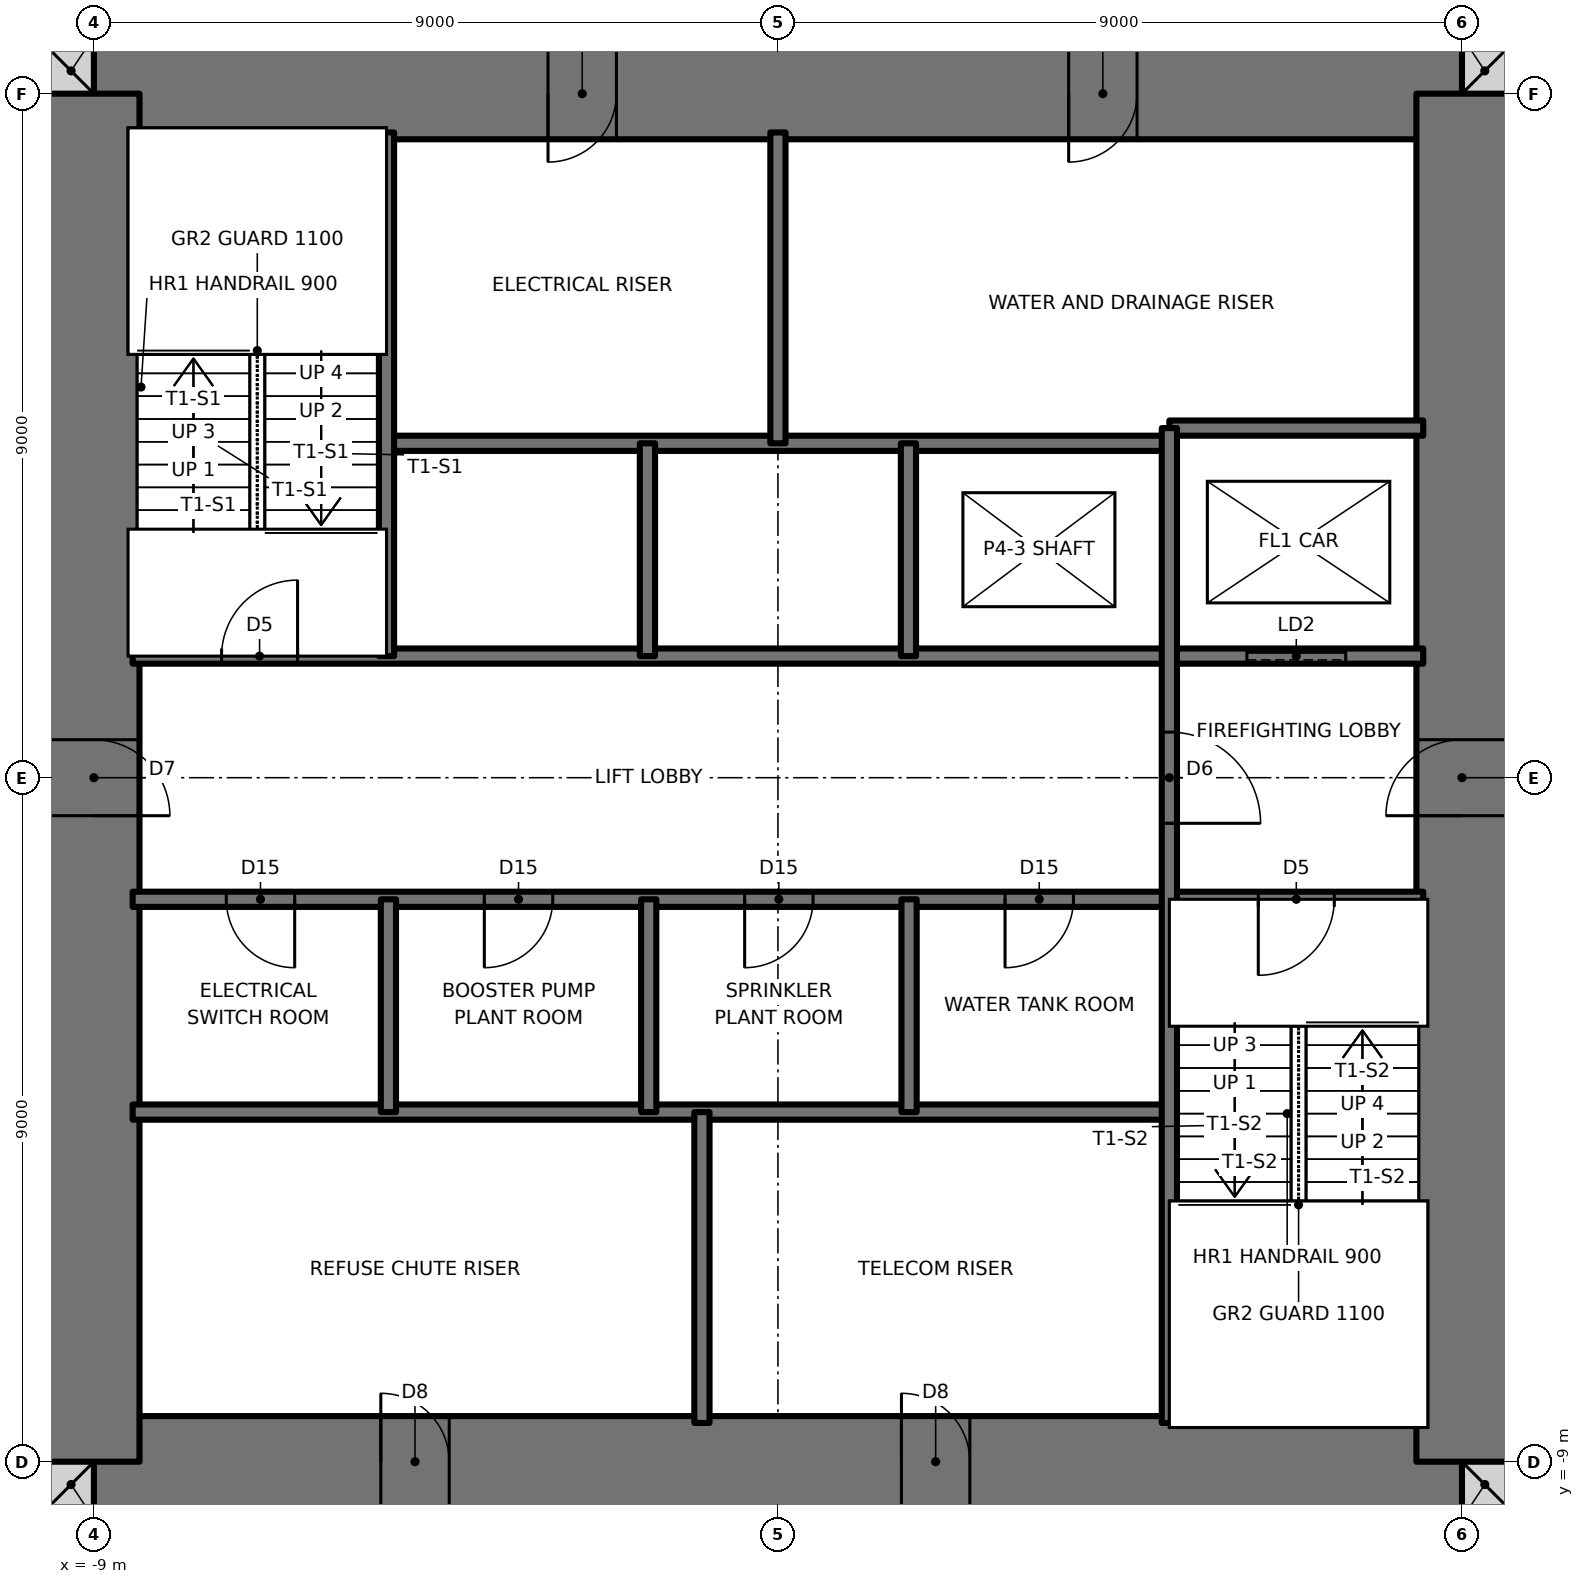
"""IFC4 building model, lengths in metres.
Left out: names, types, materials, properties, quantities, classifications, styles, units other than length and angle.
Written with IfcOpenShell. Run it as: python <this file> out.ifc"""

import sys

from ifc_helpers import new_model, si_unit, direction, frame, frame_2d, origin, place, context, subcontext, project, spatial, rectangle, extrude, element, fill, save


model = new_model("IFC4")
c1 = context("Model", 3, precision=1e-05, world=origin(), true_north=direction((0.0, 1.0)))
c2 = subcontext(c1, "Body", "Model", "MODEL_VIEW")
j1 = project(units=[si_unit("LENGTHUNIT", "METRE"), si_unit("PLANEANGLEUNIT", "RADIAN")], contexts=[c1])
p1 = place(None, origin())
s1 = spatial("IfcSite", under=j1, at=p1, CompositionType="ELEMENT")
p2 = place(p1, origin())
s2 = spatial("IfcBuilding", under=s1, at=p2, CompositionType="ELEMENT")
p3 = place(p2, frame((0.0, 0.0, 209.0)))
s3 = spatial("IfcBuildingStorey", under=s2, at=p3, CompositionType="ELEMENT", Elevation=209.0)
for number, where, z_axis, x_axis in (
    (1, (-9.6, -9.3, 0.0), (0.0, 0.0, 1.0), (1.0, 0.0, 0.0)),
    (2, (9.0, -9.3, 0.0), (0.0, 0.0, 1.0), (1.0, 0.0, 0.0)),
    (3, (9.0, 9.3, 0.0), (0.0, 0.0, 1.0), (1.0, 0.0, 0.0)),
    (4, (-9.6, 9.3, 0.0), (0.0, 0.0, 1.0), (1.0, 0.0, 0.0)),
):
    element("IfcWall", number, at=place(p3, frame(where, z_axis=z_axis, x_axis=x_axis)), inside=s3, PredefinedType="SOLIDWALL", context=c2, shape_type="SweptSolid", body=[
        extrude(rectangle(XDim=0.6, YDim=0.6, at=frame_2d((0.3, 0.0))), origin(), (0.0, 0.0, 1.0), 6.0),
    ])
p4 = place(p3, frame((-9.0, -9.0, 0.0), z_axis=(0.0, 0.0, 1.0), x_axis=(1.0, 0.0, 0.0)))
e5 = element("IfcWall", 5, at=p4, inside=s3, PredefinedType="SHEAR", context=c2, shape_type="SweptSolid", body=[
    extrude(rectangle(XDim=18.0, YDim=1.2, at=frame_2d((9.0, 0.0))), origin(), (0.0, 0.0, 1.0), 6.0),
])
p5 = place(p4, frame((3.775, 0.0, 0.0)))
e6 = element("IfcOpeningElement", 6, at=p5, cuts=e5, PredefinedType="OPENING", context=c2, shape_type="SweptSolid", body=[
    extrude(rectangle(XDim=0.9, YDim=2.1, at=frame_2d((0.45, 1.05))), frame((0.0, 0.61, 0.0), z_axis=(0.0, -1.0, 0.0), x_axis=(1.0, 0.0, 0.0)), (0.0, 0.0, 1.0), 1.22),
])
p6 = place(p4, frame((10.625, 0.0, 0.0)))
e7 = element("IfcOpeningElement", 7, at=p6, cuts=e5, PredefinedType="OPENING", context=c2, shape_type="SweptSolid", body=[
    extrude(rectangle(XDim=0.9, YDim=2.1, at=frame_2d((0.45, 1.05))), frame((0.0, 0.61, 0.0), z_axis=(0.0, -1.0, 0.0), x_axis=(1.0, 0.0, 0.0)), (0.0, 0.0, 1.0), 1.22),
])
p7 = place(p3, frame((9.0, 9.0, 0.0), z_axis=(0.0, 0.0, 1.0), x_axis=(-1.0, 0.0, 0.0)))
e8 = element("IfcWall", 8, at=p7, inside=s3, PredefinedType="SHEAR", context=c2, shape_type="SweptSolid", body=[
    extrude(rectangle(XDim=18.0, YDim=1.2, at=frame_2d((9.0, 0.0))), origin(), (0.0, 0.0, 1.0), 6.0),
])
p8 = place(p7, frame((11.125, 0.0, 0.0)))
e9 = element("IfcOpeningElement", 9, at=p8, cuts=e8, PredefinedType="OPENING", context=c2, shape_type="SweptSolid", body=[
    extrude(rectangle(XDim=0.9, YDim=2.1, at=frame_2d((0.45, 1.05))), frame((0.0, 0.61, 0.0), z_axis=(0.0, -1.0, 0.0), x_axis=(1.0, 0.0, 0.0)), (0.0, 0.0, 1.0), 1.22),
])
p9 = place(p7, frame((4.275, 0.0, 0.0)))
e10 = element("IfcOpeningElement", 10, at=p9, cuts=e8, PredefinedType="OPENING", context=c2, shape_type="SweptSolid", body=[
    extrude(rectangle(XDim=0.9, YDim=2.1, at=frame_2d((0.45, 1.05))), frame((0.0, 0.61, 0.0), z_axis=(0.0, -1.0, 0.0), x_axis=(1.0, 0.0, 0.0)), (0.0, 0.0, 1.0), 1.22),
])
p10 = place(p3, frame((9.0, -9.0, 0.0), z_axis=(0.0, 0.0, 1.0), x_axis=(0.0, 1.0, 0.0)))
e11 = element("IfcWall", 11, at=p10, inside=s3, PredefinedType="SHEAR", context=c2, shape_type="SweptSolid", body=[
    extrude(rectangle(XDim=18.0, YDim=1.2, at=frame_2d((9.0, 0.0))), origin(), (0.0, 0.0, 1.0), 6.0),
])
p11 = place(p10, frame((8.5, 0.0, 0.0)))
e12 = element("IfcOpeningElement", 12, at=p11, cuts=e11, PredefinedType="OPENING", context=c2, shape_type="SweptSolid", body=[
    extrude(rectangle(XDim=1.0, YDim=2.1, at=frame_2d((0.5, 1.05))), frame((0.0, 0.61, 0.0), z_axis=(0.0, -1.0, 0.0), x_axis=(1.0, 0.0, 0.0)), (0.0, 0.0, 1.0), 1.22),
])
p12 = place(p3, frame((-9.0, 9.0, 0.0), z_axis=(0.0, 0.0, 1.0), x_axis=(0.0, -1.0, 0.0)))
e13 = element("IfcWall", 13, at=p12, inside=s3, PredefinedType="SHEAR", context=c2, shape_type="SweptSolid", body=[
    extrude(rectangle(XDim=18.0, YDim=1.2, at=frame_2d((9.0, 0.0))), origin(), (0.0, 0.0, 1.0), 6.0),
])
p13 = place(p12, frame((8.5, 0.0, 0.0)))
e14 = element("IfcOpeningElement", 14, at=p13, cuts=e13, PredefinedType="OPENING", context=c2, shape_type="SweptSolid", body=[
    extrude(rectangle(XDim=1.0, YDim=2.1, at=frame_2d((0.5, 1.05))), frame((0.0, 0.61, 0.0), z_axis=(0.0, -1.0, 0.0), x_axis=(1.0, 0.0, 0.0)), (0.0, 0.0, 1.0), 1.22),
])
p14 = place(p3, frame((-8.49, -4.4, 0.0), z_axis=(0.0, 0.0, 1.0), x_axis=(1.0, 0.0, 0.0)))
e15 = element("IfcWall", 15, at=p14, inside=s3, PredefinedType="SOLIDWALL", context=c2, shape_type="SweptSolid", body=[
    extrude(rectangle(XDim=13.64, YDim=0.2, at=frame_2d((6.82, 0.0))), origin(), (0.0, 0.0, 1.0), 6.0),
])
p15 = place(p3, frame((-8.49, -1.6, 0.0), z_axis=(0.0, 0.0, 1.0), x_axis=(1.0, 0.0, 0.0)))
e16 = element("IfcWall", 16, at=p15, inside=s3, PredefinedType="SOLIDWALL", context=c2, shape_type="SweptSolid", body=[
    extrude(rectangle(XDim=16.98, YDim=0.2, at=frame_2d((8.49, 0.0))), origin(), (0.0, 0.0, 1.0), 6.0),
])
p16 = place(p15, frame((14.81, 0.0, 0.0)))
e17 = element("IfcOpeningElement", 17, at=p16, cuts=e16, PredefinedType="OPENING", context=c2, shape_type="SweptSolid", body=[
    extrude(rectangle(XDim=1.0, YDim=2.1, at=frame_2d((0.5, 1.05))), frame((0.0, 0.11, 0.0), z_axis=(0.0, -1.0, 0.0), x_axis=(1.0, 0.0, 0.0)), (0.0, 0.0, 1.0), 0.22),
])
p17 = place(p15, frame((1.232, 0.0, 0.0)))
e18 = element("IfcOpeningElement", 18, at=p17, cuts=e16, PredefinedType="OPENING", context=c2, shape_type="SweptSolid", body=[
    extrude(rectangle(XDim=0.9, YDim=2.1, at=frame_2d((0.45, 1.05))), frame((0.0, 0.11, 0.0), z_axis=(0.0, -1.0, 0.0), x_axis=(1.0, 0.0, 0.0)), (0.0, 0.0, 1.0), 0.22),
])
p18 = place(p15, frame((4.627, 0.0, 0.0)))
e19 = element("IfcOpeningElement", 19, at=p18, cuts=e16, PredefinedType="OPENING", context=c2, shape_type="SweptSolid", body=[
    extrude(rectangle(XDim=0.9, YDim=2.1, at=frame_2d((0.45, 1.05))), frame((0.0, 0.11, 0.0), z_axis=(0.0, -1.0, 0.0), x_axis=(1.0, 0.0, 0.0)), (0.0, 0.0, 1.0), 0.22),
])
p19 = place(p15, frame((8.052, 0.0, 0.0)))
e20 = element("IfcOpeningElement", 20, at=p19, cuts=e16, PredefinedType="OPENING", context=c2, shape_type="SweptSolid", body=[
    extrude(rectangle(XDim=0.9, YDim=2.1, at=frame_2d((0.45, 1.05))), frame((0.0, 0.11, 0.0), z_axis=(0.0, -1.0, 0.0), x_axis=(1.0, 0.0, 0.0)), (0.0, 0.0, 1.0), 0.22),
])
p20 = place(p15, frame((11.478, 0.0, 0.0)))
e21 = element("IfcOpeningElement", 21, at=p20, cuts=e16, PredefinedType="OPENING", context=c2, shape_type="SweptSolid", body=[
    extrude(rectangle(XDim=0.9, YDim=2.1, at=frame_2d((0.45, 1.05))), frame((0.0, 0.11, 0.0), z_axis=(0.0, -1.0, 0.0), x_axis=(1.0, 0.0, 0.0)), (0.0, 0.0, 1.0), 0.22),
])
p21 = place(p3, frame((-8.49, 1.6, 0.0), z_axis=(0.0, 0.0, 1.0), x_axis=(1.0, 0.0, 0.0)))
e22 = element("IfcWall", 22, at=p21, inside=s3, PredefinedType="SOLIDWALL", context=c2, shape_type="SweptSolid", body=[
    extrude(rectangle(XDim=16.98, YDim=0.2, at=frame_2d((8.49, 0.0))), origin(), (0.0, 0.0, 1.0), 6.0),
])
p22 = place(p21, frame((1.17, 0.0, 0.0)))
e23 = element("IfcOpeningElement", 23, at=p22, cuts=e22, PredefinedType="OPENING", context=c2, shape_type="SweptSolid", body=[
    extrude(rectangle(XDim=1.0, YDim=2.1, at=frame_2d((0.5, 1.05))), frame((0.0, 0.11, 0.0), z_axis=(0.0, -1.0, 0.0), x_axis=(1.0, 0.0, 0.0)), (0.0, 0.0, 1.0), 0.22),
])
p23 = place(p21, frame((14.66, 0.0, 0.0)))
e24 = element("IfcOpeningElement", 24, at=p23, cuts=e22, PredefinedType="OPENING", context=c2, shape_type="SweptSolid", body=[
    extrude(rectangle(XDim=1.3, YDim=2.1, at=frame_2d((0.65, 1.05))), frame((0.0, 0.11, 0.0), z_axis=(0.0, -1.0, 0.0), x_axis=(1.0, 0.0, 0.0)), (0.0, 0.0, 1.0), 0.22),
])
p24 = place(p3, frame((-5.15, 4.4, 0.0), z_axis=(0.0, 0.0, 1.0), x_axis=(1.0, 0.0, 0.0)))
e25 = element("IfcWall", 25, at=p24, inside=s3, PredefinedType="SOLIDWALL", context=c2, shape_type="SweptSolid", body=[
    extrude(rectangle(XDim=10.3, YDim=0.2, at=frame_2d((5.15, 0.0))), origin(), (0.0, 0.0, 1.0), 6.0),
])
p25 = place(p3, frame((5.15, 4.6, 0.0), z_axis=(0.0, 0.0, 1.0), x_axis=(1.0, 0.0, 0.0)))
e26 = element("IfcWall", 26, at=p25, inside=s3, PredefinedType="SOLIDWALL", context=c2, shape_type="SweptSolid", body=[
    extrude(rectangle(XDim=3.34, YDim=0.2, at=frame_2d((1.67, 0.0))), origin(), (0.0, 0.0, 1.0), 6.0),
])
p26 = place(p3, frame((5.15, -8.49, 0.0), z_axis=(0.0, 0.0, 1.0), x_axis=(0.0, 1.0, 0.0)))
e27 = element("IfcWall", 27, at=p26, inside=s3, PredefinedType="SOLIDWALL", context=c2, shape_type="SweptSolid", body=[
    extrude(rectangle(XDim=13.09, YDim=0.2, at=frame_2d((6.545, 0.0))), origin(), (0.0, 0.0, 1.0), 6.0),
])
p27 = place(p26, frame((7.89, 0.0, 0.0)))
e28 = element("IfcOpeningElement", 28, at=p27, cuts=e27, PredefinedType="OPENING", context=c2, shape_type="SweptSolid", body=[
    extrude(rectangle(XDim=1.2, YDim=2.1, at=frame_2d((0.6, 1.05))), frame((0.0, 0.11, 0.0), z_axis=(0.0, -1.0, 0.0), x_axis=(1.0, 0.0, 0.0)), (0.0, 0.0, 1.0), 0.22),
])
for number, where, z_axis, x_axis in (
    (29, (1.725, -4.4, 0.0), (0.0, 0.0, 1.0), (0.0, 1.0, 0.0)),
    (30, (1.717, 1.6, 0.0), (0.0, 0.0, 1.0), (0.0, 1.0, 0.0)),
):
    element("IfcWall", number, at=place(p3, frame(where, z_axis=z_axis, x_axis=x_axis)), inside=s3, PredefinedType="SOLIDWALL", context=c2, shape_type="SweptSolid", body=[
        extrude(rectangle(XDim=2.8, YDim=0.2, at=frame_2d((1.4, 0.0))), origin(), (0.0, 0.0, 1.0), 6.0),
    ])
for number, where, z_axis, x_axis in (
    (31, (0.0, 4.4, 0.0), (0.0, 0.0, 1.0), (0.0, 1.0, 0.0)),
    (32, (-1.0, -8.49, 0.0), (0.0, 0.0, 1.0), (0.0, 1.0, 0.0)),
):
    element("IfcWall", number, at=place(p3, frame(where, z_axis=z_axis, x_axis=x_axis)), inside=s3, PredefinedType="SOLIDWALL", context=c2, shape_type="SweptSolid", body=[
        extrude(rectangle(XDim=4.09, YDim=0.2, at=frame_2d((2.045, 0.0))), origin(), (0.0, 0.0, 1.0), 6.0),
    ])
for number, where, z_axis, x_axis in (
    (33, (-1.7, -4.4, 0.0), (0.0, 0.0, 1.0), (0.0, 1.0, 0.0)),
    (34, (-1.717, 1.6, 0.0), (0.0, 0.0, 1.0), (0.0, 1.0, 0.0)),
    (35, (-5.125, -4.4, 0.0), (0.0, 0.0, 1.0), (0.0, 1.0, 0.0)),
):
    element("IfcWall", number, at=place(p3, frame(where, z_axis=z_axis, x_axis=x_axis)), inside=s3, PredefinedType="SOLIDWALL", context=c2, shape_type="SweptSolid", body=[
        extrude(rectangle(XDim=2.8, YDim=0.2, at=frame_2d((1.4, 0.0))), origin(), (0.0, 0.0, 1.0), 6.0),
    ])
p28 = place(p3, frame((-5.15, 1.6, 0.0), z_axis=(0.0, 0.0, 1.0), x_axis=(0.0, 1.0, 0.0)))
e36 = element("IfcWall", 36, at=p28, inside=s3, PredefinedType="SOLIDWALL", context=c2, shape_type="SweptSolid", body=[
    extrude(rectangle(XDim=6.89, YDim=0.2, at=frame_2d((3.445, 0.0))), origin(), (0.0, 0.0, 1.0), 6.0),
])
p29 = place(p22, origin())
e37 = element("IfcDoor", 37, at=p29, inside=s3, OperationType="SINGLE_SWING_RIGHT", PredefinedType="DOOR", context=c2, shape_type="SweptSolid", body=[
    extrude(rectangle(XDim=1.0, YDim=2.1, at=frame_2d((0.5, 1.05))), frame((0.0, 0.025, 0.0), z_axis=(0.0, -1.0, 0.0), x_axis=(1.0, 0.0, 0.0)), (0.0, 0.0, 1.0), 0.05),
])
fill(e23, e37)
p30 = place(p16, frame((1.0, 0.0, 0.0), z_axis=(0.0, 0.0, 1.0), x_axis=(-1.0, 0.0, 0.0)))
e38 = element("IfcDoor", 38, at=p30, inside=s3, OperationType="SINGLE_SWING_RIGHT", PredefinedType="DOOR", context=c2, shape_type="SweptSolid", body=[
    extrude(rectangle(XDim=1.0, YDim=2.1, at=frame_2d((0.5, 1.05))), frame((0.0, 0.025, 0.0), z_axis=(0.0, -1.0, 0.0), x_axis=(1.0, 0.0, 0.0)), (0.0, 0.0, 1.0), 0.05),
])
fill(e17, e38)
p31 = place(p27, frame((1.2, 0.0, 0.0), z_axis=(0.0, 0.0, 1.0), x_axis=(-1.0, 0.0, 0.0)))
e39 = element("IfcDoor", 39, at=p31, inside=s3, OperationType="SINGLE_SWING_RIGHT", PredefinedType="DOOR", context=c2, shape_type="SweptSolid", body=[
    extrude(rectangle(XDim=1.2, YDim=2.1, at=frame_2d((0.6, 1.05))), frame((0.0, 0.025, 0.0), z_axis=(0.0, -1.0, 0.0), x_axis=(1.0, 0.0, 0.0)), (0.0, 0.0, 1.0), 0.05),
])
fill(e28, e39)
p32 = place(p17, frame((0.9, 0.0, 0.0), z_axis=(0.0, 0.0, 1.0), x_axis=(-1.0, 0.0, 0.0)))
e40 = element("IfcDoor", 40, at=p32, inside=s3, OperationType="SINGLE_SWING_LEFT", PredefinedType="DOOR", context=c2, shape_type="SweptSolid", body=[
    extrude(rectangle(XDim=0.9, YDim=2.1, at=frame_2d((0.45, 1.05))), frame((0.0, 0.025, 0.0), z_axis=(0.0, -1.0, 0.0), x_axis=(1.0, 0.0, 0.0)), (0.0, 0.0, 1.0), 0.05),
])
fill(e18, e40)
p33 = place(p18, frame((0.9, 0.0, 0.0), z_axis=(0.0, 0.0, 1.0), x_axis=(-1.0, 0.0, 0.0)))
e41 = element("IfcDoor", 41, at=p33, inside=s3, OperationType="SINGLE_SWING_RIGHT", PredefinedType="DOOR", context=c2, shape_type="SweptSolid", body=[
    extrude(rectangle(XDim=0.9, YDim=2.1, at=frame_2d((0.45, 1.05))), frame((0.0, 0.025, 0.0), z_axis=(0.0, -1.0, 0.0), x_axis=(1.0, 0.0, 0.0)), (0.0, 0.0, 1.0), 0.05),
])
fill(e19, e41)
p34 = place(p19, frame((0.9, 0.0, 0.0), z_axis=(0.0, 0.0, 1.0), x_axis=(-1.0, 0.0, 0.0)))
e42 = element("IfcDoor", 42, at=p34, inside=s3, OperationType="SINGLE_SWING_RIGHT", PredefinedType="DOOR", context=c2, shape_type="SweptSolid", body=[
    extrude(rectangle(XDim=0.9, YDim=2.1, at=frame_2d((0.45, 1.05))), frame((0.0, 0.025, 0.0), z_axis=(0.0, -1.0, 0.0), x_axis=(1.0, 0.0, 0.0)), (0.0, 0.0, 1.0), 0.05),
])
fill(e20, e42)
p35 = place(p20, frame((0.9, 0.0, 0.0), z_axis=(0.0, 0.0, 1.0), x_axis=(-1.0, 0.0, 0.0)))
e43 = element("IfcDoor", 43, at=p35, inside=s3, OperationType="SINGLE_SWING_RIGHT", PredefinedType="DOOR", context=c2, shape_type="SweptSolid", body=[
    extrude(rectangle(XDim=0.9, YDim=2.1, at=frame_2d((0.45, 1.05))), frame((0.0, 0.025, 0.0), z_axis=(0.0, -1.0, 0.0), x_axis=(1.0, 0.0, 0.0)), (0.0, 0.0, 1.0), 0.05),
])
fill(e21, e43)
p36 = place(p13, origin())
e44 = element("IfcDoor", 44, at=p36, inside=s3, OperationType="SINGLE_SWING_RIGHT", PredefinedType="DOOR", context=c2, shape_type="SweptSolid", body=[
    extrude(rectangle(XDim=1.0, YDim=2.1, at=frame_2d((0.5, 1.05))), frame((0.0, 0.025, 0.0), z_axis=(0.0, -1.0, 0.0), x_axis=(1.0, 0.0, 0.0)), (0.0, 0.0, 1.0), 0.05),
])
fill(e14, e44)
p37 = place(p11, origin())
e45 = element("IfcDoor", 45, at=p37, inside=s3, OperationType="SINGLE_SWING_LEFT", PredefinedType="DOOR", context=c2, shape_type="SweptSolid", body=[
    extrude(rectangle(XDim=1.0, YDim=2.1, at=frame_2d((0.5, 1.05))), frame((0.0, 0.025, 0.0), z_axis=(0.0, -1.0, 0.0), x_axis=(1.0, 0.0, 0.0)), (0.0, 0.0, 1.0), 0.05),
])
fill(e12, e45)
p38 = place(p8, origin())
e46 = element("IfcDoor", 46, at=p38, inside=s3, OperationType="SINGLE_SWING_RIGHT", PredefinedType="DOOR", context=c2, shape_type="SweptSolid", body=[
    extrude(rectangle(XDim=0.9, YDim=2.1, at=frame_2d((0.45, 1.05))), frame((0.0, 0.025, 0.0), z_axis=(0.0, -1.0, 0.0), x_axis=(1.0, 0.0, 0.0)), (0.0, 0.0, 1.0), 0.05),
])
fill(e9, e46)
p39 = place(p9, origin())
e47 = element("IfcDoor", 47, at=p39, inside=s3, OperationType="SINGLE_SWING_RIGHT", PredefinedType="DOOR", context=c2, shape_type="SweptSolid", body=[
    extrude(rectangle(XDim=0.9, YDim=2.1, at=frame_2d((0.45, 1.05))), frame((0.0, 0.025, 0.0), z_axis=(0.0, -1.0, 0.0), x_axis=(1.0, 0.0, 0.0)), (0.0, 0.0, 1.0), 0.05),
])
fill(e10, e47)
p40 = place(p5, origin())
e48 = element("IfcDoor", 48, at=p40, inside=s3, OperationType="SINGLE_SWING_LEFT", PredefinedType="DOOR", context=c2, shape_type="SweptSolid", body=[
    extrude(rectangle(XDim=0.9, YDim=2.1, at=frame_2d((0.45, 1.05))), frame((0.0, 0.025, 0.0), z_axis=(0.0, -1.0, 0.0), x_axis=(1.0, 0.0, 0.0)), (0.0, 0.0, 1.0), 0.05),
])
fill(e6, e48)
p41 = place(p6, origin())
e49 = element("IfcDoor", 49, at=p41, inside=s3, OperationType="SINGLE_SWING_LEFT", PredefinedType="DOOR", context=c2, shape_type="SweptSolid", body=[
    extrude(rectangle(XDim=0.9, YDim=2.1, at=frame_2d((0.45, 1.05))), frame((0.0, 0.025, 0.0), z_axis=(0.0, -1.0, 0.0), x_axis=(1.0, 0.0, 0.0)), (0.0, 0.0, 1.0), 0.05),
])
fill(e7, e49)
p42 = place(p23, origin())
e50 = element("IfcDoor", 50, at=p42, inside=s3, OperationType="SLIDING_TO_LEFT", PredefinedType="DOOR", context=c2, shape_type="SweptSolid", body=[
    extrude(rectangle(XDim=1.3, YDim=2.1, at=frame_2d((0.65, 1.05))), frame((0.0, 0.025, 0.0), z_axis=(0.0, -1.0, 0.0), x_axis=(1.0, 0.0, 0.0)), (0.0, 0.0, 1.0), 0.05),
])
fill(e24, e50)
save(model, sys.argv[1])
